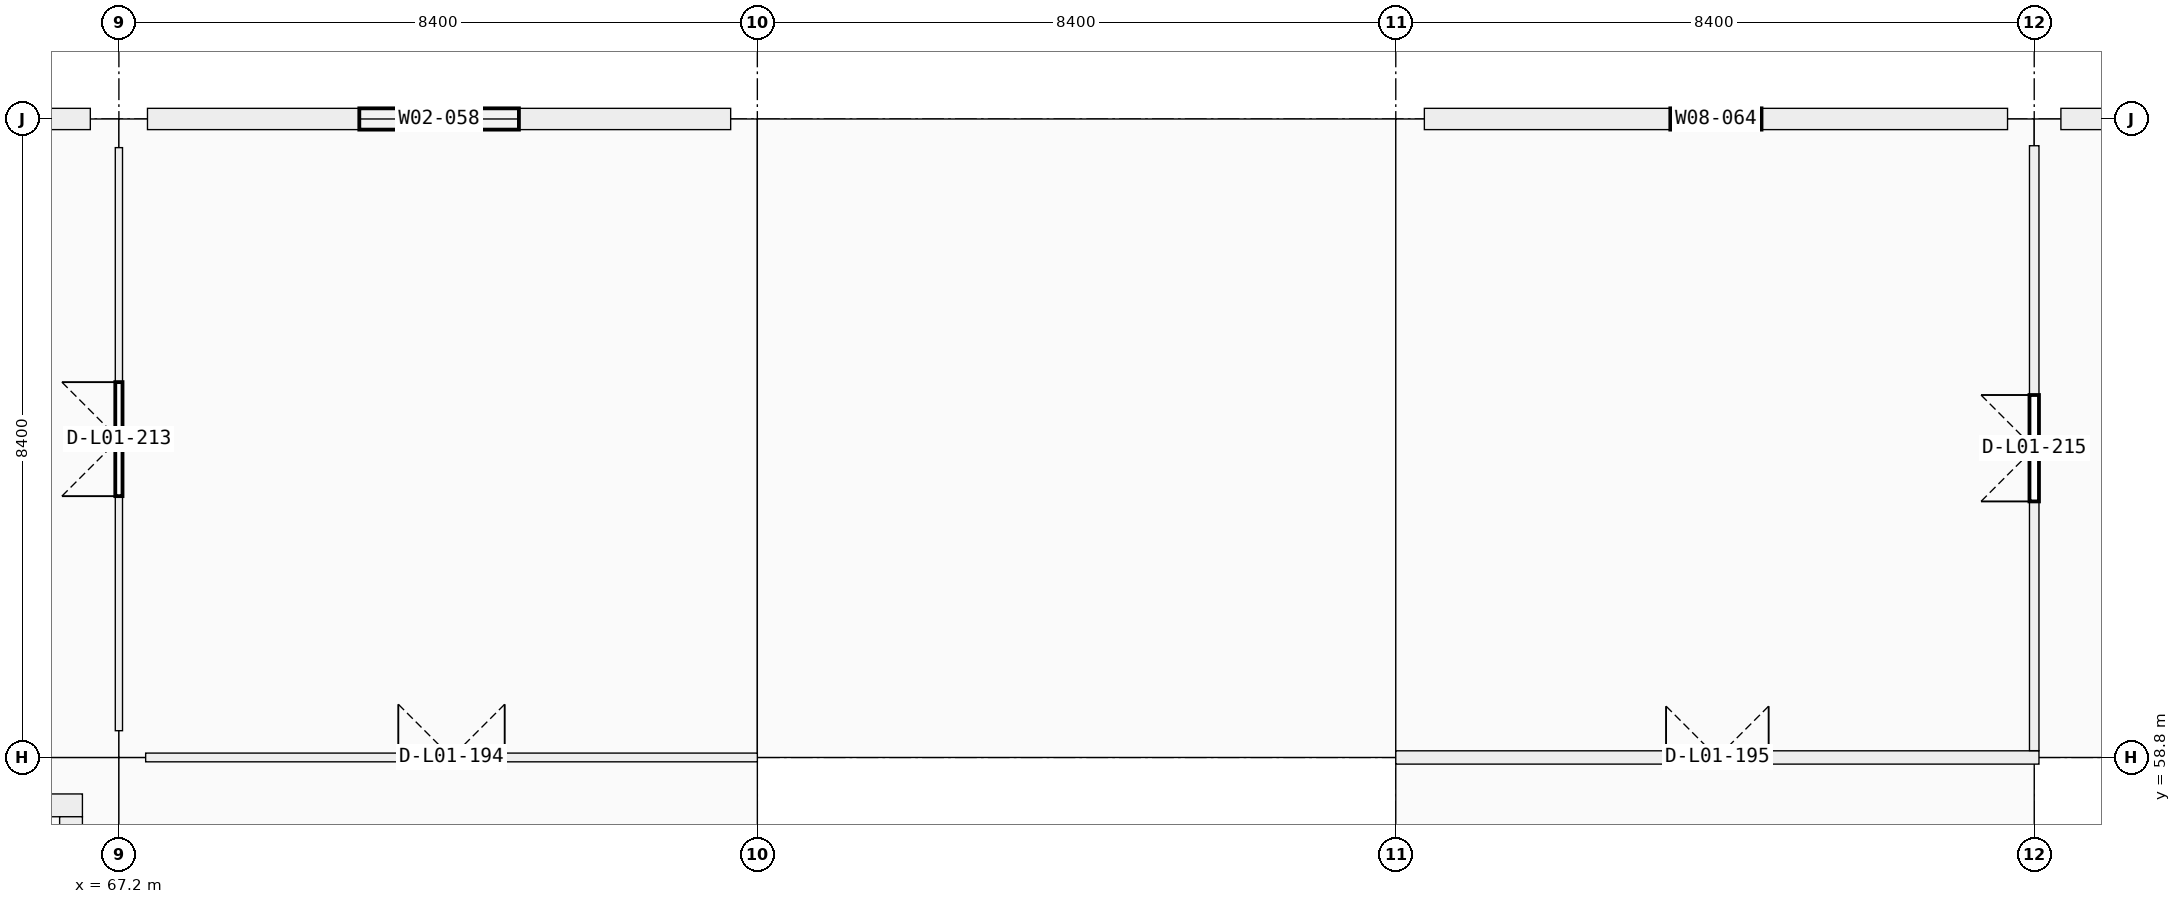
"""IFC4 building model, lengths in metres.
Left out: names, types, materials, properties, quantities, classifications, styles, units other than length and angle.
Written with IfcOpenShell. Run it as: python <this file> out.ifc"""

import sys

from ifc_helpers import new_model, si_unit, direction, frame, frame_2d, origin, origin_2d, place, context, subcontext, project, spatial, rectangle, extrude, element, fill, save


model = new_model("IFC4")
c1 = context("Model", 3, precision=1e-05, world=origin(), true_north=direction((0.0, 1.0)))
c2 = subcontext(c1, "Body", "Model", "MODEL_VIEW")
j1 = project(units=[si_unit("LENGTHUNIT", "METRE"), si_unit("PLANEANGLEUNIT", "RADIAN")], contexts=[c1])
p1 = place(None, origin())
s1 = spatial("IfcSite", under=j1, at=p1, CompositionType="ELEMENT")
p2 = place(p1, origin())
s2 = spatial("IfcBuilding", under=s1, at=p2, CompositionType="ELEMENT")
p3 = place(p2, frame((0.0, 0.0, 5.76)))
s3 = spatial("IfcBuildingStorey", under=s2, at=p3, CompositionType="ELEMENT", Elevation=5.76)
p4 = place(p3, frame((67.2, 58.8, 0.0), z_axis=(0.0, 0.0, 1.0), x_axis=(1.0, 0.0, 0.0)))
e1 = element("IfcColumn", 1, at=p4, inside=s3, PredefinedType="COLUMN", context=c2, shape_type="SweptSolid", body=[
    extrude(rectangle(XDim=0.7, YDim=0.7, at=origin_2d()), origin(), (0.0, 0.0, 1.0), 4.5),
])
p5 = place(p3, frame((67.2, 67.2, 0.0), z_axis=(0.0, 0.0, 1.0), x_axis=(1.0, 0.0, 0.0)))
e2 = element("IfcColumn", 2, at=p5, inside=s3, PredefinedType="COLUMN", context=c2, shape_type="SweptSolid", body=[
    extrude(rectangle(XDim=0.75, YDim=0.75, at=origin_2d()), origin(), (0.0, 0.0, 1.0), 4.5),
])
p6 = place(p3, frame((75.6, 67.2, 0.0), z_axis=(0.0, 0.0, 1.0), x_axis=(1.0, 0.0, 0.0)))
e3 = element("IfcColumn", 3, at=p6, inside=s3, PredefinedType="COLUMN", context=c2, shape_type="SweptSolid", body=[
    extrude(rectangle(XDim=0.7, YDim=0.7, at=origin_2d()), origin(), (0.0, 0.0, 1.0), 4.5),
])
p7 = place(p3, frame((84.0, 67.2, 0.0), z_axis=(0.0, 0.0, 1.0), x_axis=(1.0, 0.0, 0.0)))
e4 = element("IfcColumn", 4, at=p7, inside=s3, PredefinedType="COLUMN", context=c2, shape_type="SweptSolid", body=[
    extrude(rectangle(XDim=0.75, YDim=0.75, at=origin_2d()), origin(), (0.0, 0.0, 1.0), 4.5),
])
p8 = place(p3, frame((92.4, 67.2, 0.0), z_axis=(0.0, 0.0, 1.0), x_axis=(1.0, 0.0, 0.0)))
e5 = element("IfcColumn", 5, at=p8, inside=s3, PredefinedType="COLUMN", context=c2, shape_type="SweptSolid", body=[
    extrude(rectangle(XDim=0.7, YDim=0.7, at=origin_2d()), origin(), (0.0, 0.0, 1.0), 4.5),
])
p9 = place(p3, frame((59.201, 67.2, 0.0), z_axis=(0.0, 0.0, 1.0), x_axis=(1.0, 0.0, 0.0)))
e6 = element("IfcWall", 6, at=p9, inside=s3, PredefinedType="SOLIDWALL", context=c2, shape_type="SweptSolid", body=[
    extrude(rectangle(XDim=7.623, YDim=0.28, at=frame_2d((3.812, 0.0))), origin(), (0.0, 0.0, 1.0), 3.4),
])
p10 = place(p9, frame((2.787, 0.0, 0.9)))
e7 = element("IfcOpeningElement", 7, at=p10, cuts=e6, PredefinedType="OPENING", context=c2, shape_type="SweptSolid", body=[
    extrude(rectangle(XDim=2.05, YDim=1.45, at=frame_2d((1.025, 0.725))), frame((0.0, 0.14, 0.0), z_axis=(0.0, -1.0, 0.0), x_axis=(1.0, 0.0, 0.0)), (0.0, 0.0, 1.0), 0.28),
])
p11 = place(p3, frame((67.576, 67.2, 0.0), z_axis=(0.0, 0.0, 1.0), x_axis=(1.0, 0.0, 0.0)))
e8 = element("IfcWall", 8, at=p11, inside=s3, PredefinedType="SOLIDWALL", context=c2, shape_type="SweptSolid", body=[
    extrude(rectangle(XDim=7.673, YDim=0.28, at=frame_2d((3.836, 0.0))), origin(), (0.0, 0.0, 1.0), 3.4),
])
p12 = place(p11, frame((2.787, 0.0, 0.9)))
e9 = element("IfcOpeningElement", 9, at=p12, cuts=e8, PredefinedType="OPENING", context=c2, shape_type="SweptSolid", body=[
    extrude(rectangle(XDim=2.1, YDim=1.8, at=frame_2d((1.05, 0.9))), frame((0.0, 0.14, 0.0), z_axis=(0.0, -1.0, 0.0), x_axis=(1.0, 0.0, 0.0)), (0.0, 0.0, 1.0), 0.28),
])
p13 = place(p3, frame((84.376, 67.2, 0.0), z_axis=(0.0, 0.0, 1.0), x_axis=(1.0, 0.0, 0.0)))
e10 = element("IfcWall", 10, at=p13, inside=s3, PredefinedType="SOLIDWALL", context=c2, shape_type="SweptSolid", body=[
    extrude(rectangle(XDim=7.673, YDim=0.28, at=frame_2d((3.836, 0.0))), origin(), (0.0, 0.0, 1.0), 3.4),
])
p14 = place(p13, frame((3.236, 0.0, 0.9)))
e11 = element("IfcOpeningElement", 11, at=p14, cuts=e10, PredefinedType="OPENING", context=c2, shape_type="SweptSolid", body=[
    extrude(rectangle(XDim=1.2, YDim=2.1, at=frame_2d((0.6, 1.05))), frame((0.0, 0.14, 0.0), z_axis=(0.0, -1.0, 0.0), x_axis=(1.0, 0.0, 0.0)), (0.0, 0.0, 1.0), 0.28),
])
p15 = place(p3, frame((92.751, 67.2, 0.0), z_axis=(0.0, 0.0, 1.0), x_axis=(1.0, 0.0, 0.0)))
e12 = element("IfcWall", 12, at=p15, inside=s3, PredefinedType="SOLIDWALL", context=c2, shape_type="SweptSolid", body=[
    extrude(rectangle(XDim=7.673, YDim=0.28, at=frame_2d((3.836, 0.0))), origin(), (0.0, 0.0, 1.0), 3.4),
])
p16 = place(p15, frame((2.437, 0.0, 0.9)))
e13 = element("IfcOpeningElement", 13, at=p16, cuts=e12, PredefinedType="OPENING", context=c2, shape_type="SweptSolid", body=[
    extrude(rectangle(XDim=2.8, YDim=1.75, at=frame_2d((1.4, 0.875))), frame((0.0, 0.14, 0.0), z_axis=(0.0, -1.0, 0.0), x_axis=(1.0, 0.0, 0.0)), (0.0, 0.0, 1.0), 0.28),
])
p17 = place(p3, frame((59.28, 58.17, 0.0), z_axis=(0.0, 0.0, 1.0), x_axis=(1.0, 0.0, 0.0)))
e14 = element("IfcWall", 14, at=p17, inside=s3, PredefinedType="SHEAR", context=c2, shape_type="SweptSolid", body=[
    extrude(rectangle(XDim=7.44, YDim=0.3, at=frame_2d((3.72, 0.0))), origin(), (0.0, 0.0, 1.0), 4.5),
])
p18 = place(p3, frame((66.57, 58.02, 0.0), z_axis=(0.0, 0.0, 1.0), x_axis=(0.0, -1.0, 0.0)))
e15 = element("IfcWall", 15, at=p18, inside=s3, PredefinedType="SHEAR", context=c2, shape_type="SweptSolid", body=[
    extrude(rectangle(XDim=6.84, YDim=0.3, at=frame_2d((3.42, 0.0))), origin(), (0.0, 0.0, 1.0), 4.5),
])
p19 = place(p18, frame((3.97, 0.0, 0.0)))
e16 = element("IfcOpeningElement", 16, at=p19, cuts=e15, PredefinedType="OPENING", context=c2, shape_type="SweptSolid", body=[
    extrude(rectangle(XDim=1.5, YDim=2.15, at=frame_2d((0.75, 1.075))), frame((0.0, 0.15, 0.0), z_axis=(0.0, -1.0, 0.0), x_axis=(1.0, 0.0, 0.0)), (0.0, 0.0, 1.0), 0.3),
])
p20 = place(p3, frame((67.552, 58.8, 0.0), z_axis=(0.0, 0.0, 1.0), x_axis=(1.0, 0.0, 0.0)))
e17 = element("IfcWall", 17, at=p20, inside=s3, PredefinedType="PARTITIONING", context=c2, shape_type="SweptSolid", body=[
    extrude(rectangle(XDim=8.048, YDim=0.115, at=frame_2d((4.024, 0.0))), origin(), (0.0, 0.0, 1.0), 2.4),
])
p21 = place(p20, frame((3.324, 0.0, 0.0)))
e18 = element("IfcOpeningElement", 18, at=p21, cuts=e17, PredefinedType="OPENING", context=c2, shape_type="SweptSolid", body=[
    extrude(rectangle(XDim=1.4, YDim=2.22, at=frame_2d((0.7, 1.11))), frame((0.0, 0.058, 0.0), z_axis=(0.0, -1.0, 0.0), x_axis=(1.0, 0.0, 0.0)), (0.0, 0.0, 1.0), 0.115),
])
p22 = place(p3, frame((84.0, 58.8, 0.0), z_axis=(0.0, 0.0, 1.0), x_axis=(1.0, 0.0, 0.0)))
e19 = element("IfcWall", 19, at=p22, inside=s3, PredefinedType="PARTITIONING", context=c2, shape_type="SweptSolid", body=[
    extrude(rectangle(XDim=8.462, YDim=0.175, at=frame_2d((4.231, 0.0))), origin(), (0.0, 0.0, 1.0), 2.4),
])
p23 = place(p22, frame((3.556, 0.0, 0.0)))
e20 = element("IfcOpeningElement", 20, at=p23, cuts=e19, PredefinedType="OPENING", context=c2, shape_type="SweptSolid", body=[
    extrude(rectangle(XDim=1.35, YDim=2.2, at=frame_2d((0.675, 1.1))), frame((0.0, 0.087, 0.0), z_axis=(0.0, -1.0, 0.0), x_axis=(1.0, 0.0, 0.0)), (0.0, 0.0, 1.0), 0.175),
])
p24 = place(p3, frame((67.2, 59.152, 0.0), z_axis=(0.0, 0.0, 1.0), x_axis=(0.0, 1.0, 0.0)))
e21 = element("IfcWall", 21, at=p24, inside=s3, PredefinedType="PARTITIONING", context=c2, shape_type="SweptSolid", body=[
    extrude(rectangle(XDim=7.671, YDim=0.095, at=frame_2d((3.835, 0.0))), origin(), (0.0, 0.0, 1.0), 2.4),
])
p25 = place(p24, frame((3.086, 0.0, 0.0)))
e22 = element("IfcOpeningElement", 22, at=p25, cuts=e21, PredefinedType="OPENING", context=c2, shape_type="SweptSolid", body=[
    extrude(rectangle(XDim=1.5, YDim=2.22, at=frame_2d((0.75, 1.11))), frame((0.0, 0.047, 0.0), z_axis=(0.0, -1.0, 0.0), x_axis=(1.0, 0.0, 0.0)), (0.0, 0.0, 1.0), 0.095),
])
p26 = place(p3, frame((92.4, 58.889, 0.0), z_axis=(0.0, 0.0, 1.0), x_axis=(0.0, 1.0, 0.0)))
e23 = element("IfcWall", 23, at=p26, inside=s3, PredefinedType="PARTITIONING", context=c2, shape_type="SweptSolid", body=[
    extrude(rectangle(XDim=7.958, YDim=0.125, at=frame_2d((3.979, 0.0))), origin(), (0.0, 0.0, 1.0), 2.4),
])
p27 = place(p26, frame((3.279, 0.0, 0.0)))
e24 = element("IfcOpeningElement", 24, at=p27, cuts=e23, PredefinedType="OPENING", context=c2, shape_type="SweptSolid", body=[
    extrude(rectangle(XDim=1.4, YDim=2.22, at=frame_2d((0.7, 1.11))), frame((0.0, 0.062, 0.0), z_axis=(0.0, -1.0, 0.0), x_axis=(1.0, 0.0, 0.0)), (0.0, 0.0, 1.0), 0.125),
])
p28 = place(p12, origin())
e25 = element("IfcWindow", 25, at=p28, inside=s3, PartitioningType="SINGLE_PANEL", PredefinedType="WINDOW", context=c2, shape_type="SweptSolid", body=[
    extrude(rectangle(XDim=2.1, YDim=1.8, at=frame_2d((1.05, 0.9))), frame((0.0, 0.03, 0.0), z_axis=(0.0, -1.0, 0.0), x_axis=(1.0, 0.0, 0.0)), (0.0, 0.0, 1.0), 0.06),
])
fill(e9, e25)
p29 = place(p14, origin())
e26 = element("IfcWindow", 26, at=p29, inside=s3, PartitioningType="SINGLE_PANEL", PredefinedType="WINDOW", context=c2, shape_type="SweptSolid", body=[
    extrude(rectangle(XDim=1.2, YDim=2.1, at=frame_2d((0.6, 1.05))), frame((0.0, 0.03, 0.0), z_axis=(0.0, -1.0, 0.0), x_axis=(1.0, 0.0, 0.0)), (0.0, 0.0, 1.0), 0.06),
])
fill(e11, e26)
p30 = place(p21, origin())
e27 = element("IfcDoor", 27, at=p30, inside=s3, OperationType="DOUBLE_DOOR_SINGLE_SWING", PredefinedType="DOOR", context=c2, shape_type="SweptSolid", body=[
    extrude(rectangle(XDim=1.4, YDim=2.22, at=frame_2d((0.7, 1.11))), frame((0.0, 0.025, 0.0), z_axis=(0.0, -1.0, 0.0), x_axis=(1.0, 0.0, 0.0)), (0.0, 0.0, 1.0), 0.05),
])
fill(e18, e27)
p31 = place(p23, origin())
e28 = element("IfcDoor", 28, at=p31, inside=s3, OperationType="DOUBLE_DOOR_SINGLE_SWING", PredefinedType="DOOR", context=c2, shape_type="SweptSolid", body=[
    extrude(rectangle(XDim=1.35, YDim=2.2, at=frame_2d((0.675, 1.1))), frame((0.0, 0.025, 0.0), z_axis=(0.0, -1.0, 0.0), x_axis=(1.0, 0.0, 0.0)), (0.0, 0.0, 1.0), 0.05),
])
fill(e20, e28)
p32 = place(p25, origin())
e29 = element("IfcDoor", 29, at=p32, inside=s3, OperationType="DOUBLE_DOOR_SINGLE_SWING", PredefinedType="DOOR", context=c2, shape_type="SweptSolid", body=[
    extrude(rectangle(XDim=1.5, YDim=2.22, at=frame_2d((0.75, 1.11))), frame((0.0, 0.025, 0.0), z_axis=(0.0, -1.0, 0.0), x_axis=(1.0, 0.0, 0.0)), (0.0, 0.0, 1.0), 0.05),
])
fill(e22, e29)
p33 = place(p27, origin())
e30 = element("IfcDoor", 30, at=p33, inside=s3, OperationType="DOUBLE_DOOR_SINGLE_SWING", PredefinedType="DOOR", context=c2, shape_type="SweptSolid", body=[
    extrude(rectangle(XDim=1.4, YDim=2.22, at=frame_2d((0.7, 1.11))), frame((0.0, 0.025, 0.0), z_axis=(0.0, -1.0, 0.0), x_axis=(1.0, 0.0, 0.0)), (0.0, 0.0, 1.0), 0.05),
])
fill(e24, e30)
save(model, sys.argv[1])
